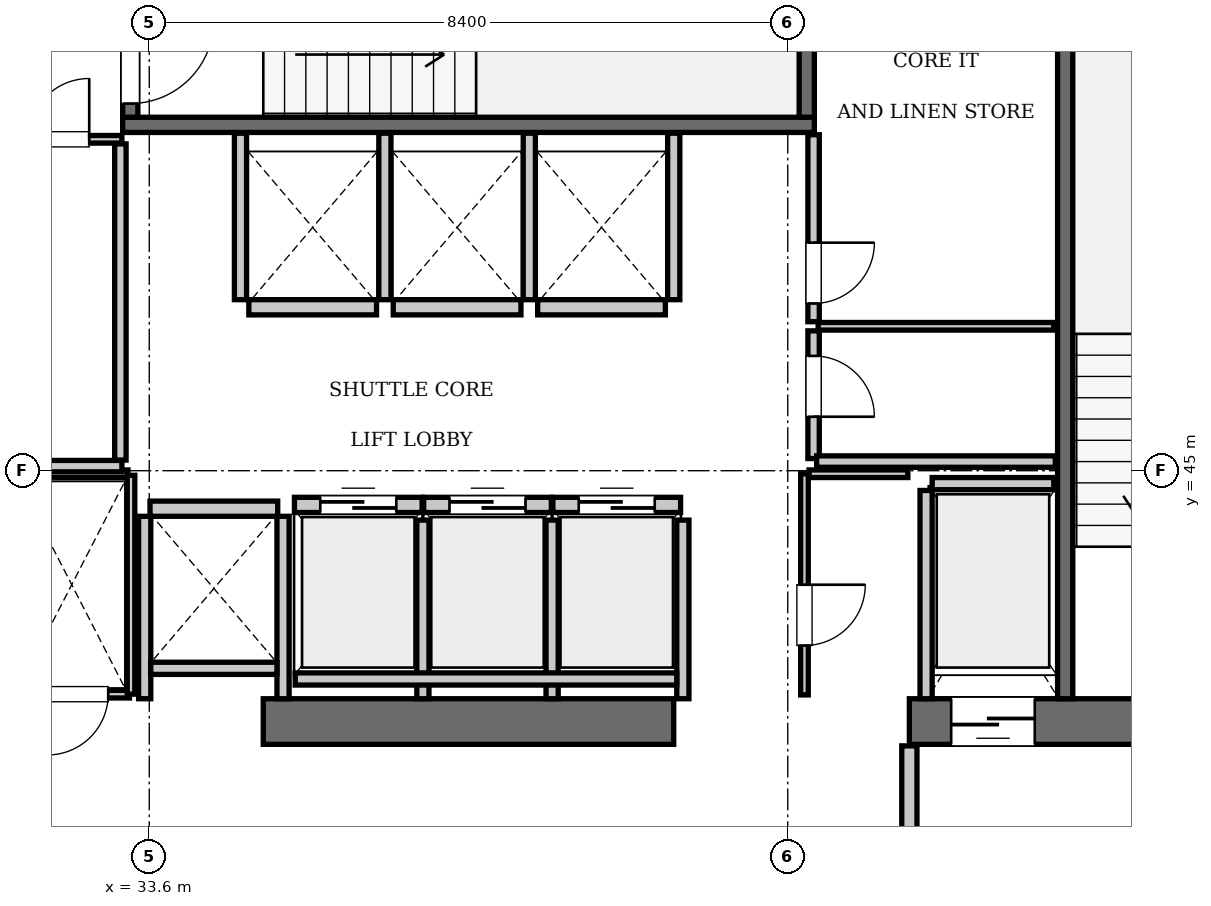
"""IFC4 building model, lengths in metres.
Left out: names, types, materials, properties, quantities, classifications, styles, units other than length and angle.
Written with IfcOpenShell. Run it as: python <this file> out.ifc"""

import sys

from ifc_helpers import new_model, si_unit, direction, frame, frame_2d, origin, place, context, subcontext, project, spatial, rectangle, extrude, element, fill, save


model = new_model("IFC4")
c1 = context("Model", 3, precision=1e-05, world=origin(), true_north=direction((0.0, 1.0)))
c2 = subcontext(c1, "Body", "Model", "MODEL_VIEW")
j1 = project(units=[si_unit("LENGTHUNIT", "METRE"), si_unit("PLANEANGLEUNIT", "RADIAN")], contexts=[c1])
p1 = place(None, origin())
s1 = spatial("IfcSite", under=j1, at=p1, CompositionType="ELEMENT")
p2 = place(p1, origin())
s2 = spatial("IfcBuilding", under=s1, at=p2, CompositionType="ELEMENT")
p3 = place(p2, frame((0.0, 0.0, 274.05)))
s3 = spatial("IfcBuildingStorey", under=s2, at=p3, CompositionType="ELEMENT", Elevation=274.05)
p4 = place(p3, frame((35.1, 41.7, 0.0), z_axis=(0.0, 0.0, 1.0), x_axis=(1.0, 0.0, 0.0)))
e1 = element("IfcWall", 1, at=p4, inside=s3, PredefinedType="SHEAR", context=c2, shape_type="SweptSolid", body=[
    extrude(rectangle(XDim=5.4, YDim=0.6, at=frame_2d((2.7, 0.0))), origin(), (0.0, 0.0, 1.0), 3.85),
])
p5 = place(p3, frame((43.6, 41.7, 0.0), z_axis=(0.0, 0.0, 1.0), x_axis=(1.0, 0.0, 0.0)))
e2 = element("IfcWall", 2, at=p5, inside=s3, PredefinedType="SHEAR", context=c2, shape_type="SweptSolid", body=[
    extrude(rectangle(XDim=6.8, YDim=0.6, at=frame_2d((3.4, 0.0))), origin(), (0.0, 0.0, 1.0), 3.85),
])
p6 = place(p5, frame((3.9, 0.0, 0.0)))
e3 = element("IfcOpeningElement", 3, at=p6, cuts=e2, PredefinedType="OPENING", context=c2, shape_type="SweptSolid", body=[
    extrude(rectangle(XDim=1.15, YDim=2.15, at=frame_2d((0.575, 1.075))), frame((0.0, 0.31, 0.0), z_axis=(0.0, -1.0, 0.0), x_axis=(1.0, 0.0, 0.0)), (0.0, 0.0, 1.0), 0.62),
])
p7 = place(p5, frame((0.55, 0.0, 0.0)))
e4 = element("IfcOpeningElement", 4, at=p7, cuts=e2, PredefinedType="OPENING", context=c2, shape_type="SweptSolid", body=[
    extrude(rectangle(XDim=1.1, YDim=2.2, at=frame_2d((0.55, 1.1))), frame((0.0, 0.31, 0.0), z_axis=(0.0, -1.0, 0.0), x_axis=(1.0, 0.0, 0.0)), (0.0, 0.0, 1.0), 0.62),
])
p8 = place(p3, frame((33.25, 49.55, 0.0), z_axis=(0.0, 0.0, 1.0), x_axis=(1.0, 0.0, 0.0)))
e5 = element("IfcWall", 5, at=p8, inside=s3, PredefinedType="SOLIDWALL", context=c2, shape_type="SweptSolid", body=[
    extrude(rectangle(XDim=9.1, YDim=0.2, at=frame_2d((4.55, 0.0))), origin(), (0.0, 0.0, 1.0), 3.61),
])
p9 = place(p3, frame((42.25, 49.65, 0.0), z_axis=(0.0, 0.0, 1.0), x_axis=(0.0, 1.0, 0.0)))
e6 = element("IfcWall", 6, at=p9, inside=s3, PredefinedType="SOLIDWALL", context=c2, shape_type="SweptSolid", body=[
    extrude(rectangle(XDim=3.75, YDim=0.2, at=frame_2d((1.875, 0.0))), origin(), (0.0, 0.0, 1.0), 3.61),
])
p10 = place(p3, frame((33.35, 49.65, 0.0), z_axis=(0.0, 0.0, 1.0), x_axis=(0.0, 1.0, 0.0)))
e7 = element("IfcWall", 7, at=p10, inside=s3, PredefinedType="SOLIDWALL", context=c2, shape_type="SweptSolid", body=[
    extrude(rectangle(XDim=3.75, YDim=0.2, at=frame_2d((1.875, 0.0))), origin(), (0.0, 0.0, 1.0), 3.61),
])
p11 = place(p10, frame((0.18, 0.0, 0.0)))
e8 = element("IfcOpeningElement", 8, at=p11, cuts=e7, PredefinedType="OPENING", context=c2, shape_type="SweptSolid", body=[
    extrude(rectangle(XDim=1.1, YDim=2.15, at=frame_2d((0.55, 1.075))), frame((0.0, 0.11, 0.0), z_axis=(0.0, -1.0, 0.0), x_axis=(1.0, 0.0, 0.0)), (0.0, 0.0, 1.0), 0.22),
])
p12 = place(p3, frame((45.65, 42.0, 0.0), z_axis=(0.0, 0.0, 1.0), x_axis=(0.0, 1.0, 0.0)))
e9 = element("IfcWall", 9, at=p12, inside=s3, PredefinedType="SOLIDWALL", context=c2, shape_type="SweptSolid", body=[
    extrude(rectangle(XDim=9.15, YDim=0.2, at=frame_2d((4.575, 0.0))), origin(), (0.0, 0.0, 1.0), 3.61),
])
p13 = place(p3, frame((35.51, 44.55, 0.0), z_axis=(0.0, 0.0, 1.0), x_axis=(1.0, 0.0, 0.0)))
e10 = element("IfcWall", 10, at=p13, inside=s3, PredefinedType="SOLIDWALL", context=c2, shape_type="SweptSolid", body=[
    extrude(rectangle(XDim=1.68, YDim=0.2, at=frame_2d((0.84, 0.0))), origin(), (0.0, 0.0, 1.0), 3.61),
])
p14 = place(p13, frame((0.34, 0.0, 0.0)))
e11 = element("IfcOpeningElement", 11, at=p14, cuts=e10, PredefinedType="OPENING", context=c2, shape_type="SweptSolid", body=[
    extrude(rectangle(XDim=1.0, YDim=2.15, at=frame_2d((0.5, 1.075))), frame((0.0, 0.11, 0.0), z_axis=(0.0, -1.0, 0.0), x_axis=(1.0, 0.0, 0.0)), (0.0, 0.0, 1.0), 0.22),
])
p15 = place(p3, frame((37.21, 44.55, 0.0), z_axis=(0.0, 0.0, 1.0), x_axis=(1.0, 0.0, 0.0)))
e12 = element("IfcWall", 12, at=p15, inside=s3, PredefinedType="SOLIDWALL", context=c2, shape_type="SweptSolid", body=[
    extrude(rectangle(XDim=1.68, YDim=0.2, at=frame_2d((0.84, 0.0))), origin(), (0.0, 0.0, 1.0), 3.61),
])
p16 = place(p15, frame((0.34, 0.0, 0.0)))
e13 = element("IfcOpeningElement", 13, at=p16, cuts=e12, PredefinedType="OPENING", context=c2, shape_type="SweptSolid", body=[
    extrude(rectangle(XDim=1.0, YDim=2.15, at=frame_2d((0.5, 1.075))), frame((0.0, 0.11, 0.0), z_axis=(0.0, -1.0, 0.0), x_axis=(1.0, 0.0, 0.0)), (0.0, 0.0, 1.0), 0.22),
])
p17 = place(p3, frame((38.91, 44.55, 0.0), z_axis=(0.0, 0.0, 1.0), x_axis=(1.0, 0.0, 0.0)))
e14 = element("IfcWall", 14, at=p17, inside=s3, PredefinedType="SOLIDWALL", context=c2, shape_type="SweptSolid", body=[
    extrude(rectangle(XDim=1.68, YDim=0.2, at=frame_2d((0.84, 0.0))), origin(), (0.0, 0.0, 1.0), 3.61),
])
p18 = place(p17, frame((0.34, 0.0, 0.0)))
e15 = element("IfcOpeningElement", 15, at=p18, cuts=e14, PredefinedType="OPENING", context=c2, shape_type="SweptSolid", body=[
    extrude(rectangle(XDim=1.0, YDim=2.15, at=frame_2d((0.5, 1.075))), frame((0.0, 0.11, 0.0), z_axis=(0.0, -1.0, 0.0), x_axis=(1.0, 0.0, 0.0)), (0.0, 0.0, 1.0), 0.22),
])
p19 = place(p3, frame((34.91, 47.15, 0.0), z_axis=(0.0, 0.0, 1.0), x_axis=(1.0, 0.0, 0.0)))
e16 = element("IfcWall", 16, at=p19, inside=s3, PredefinedType="SOLIDWALL", context=c2, shape_type="SweptSolid", body=[
    extrude(rectangle(XDim=1.68, YDim=0.2, at=frame_2d((0.84, 0.0))), origin(), (0.0, 0.0, 1.0), 3.61),
])
for number, where, z_axis, x_axis in (
    (17, (36.81, 47.15, 0.0), (0.0, 0.0, 1.0), (1.0, 0.0, 0.0)),
    (18, (38.71, 47.15, 0.0), (0.0, 0.0, 1.0), (1.0, 0.0, 0.0)),
    (19, (33.61, 44.5, 0.0), (0.0, 0.0, 1.0), (1.0, 0.0, 0.0)),
):
    element("IfcWall", number, at=place(p3, frame(where, z_axis=z_axis, x_axis=x_axis)), inside=s3, PredefinedType="SOLIDWALL", context=c2, shape_type="SweptSolid", body=[
        extrude(rectangle(XDim=1.68, YDim=0.2, at=frame_2d((0.84, 0.0))), origin(), (0.0, 0.0, 1.0), 3.61),
    ])
p20 = place(p3, frame((43.9, 44.83, 0.0), z_axis=(0.0, 0.0, 1.0), x_axis=(1.0, 0.0, 0.0)))
e20 = element("IfcWall", 20, at=p20, inside=s3, PredefinedType="SOLIDWALL", context=c2, shape_type="SweptSolid", body=[
    extrude(rectangle(XDim=1.6, YDim=0.16, at=frame_2d((0.8, 0.0))), origin(), (0.0, 0.0, 1.0), 3.61),
])
p21 = place(p3, frame((43.82, 42.0, 0.0), z_axis=(0.0, 0.0, 1.0), x_axis=(0.0, 1.0, 0.0)))
e21 = element("IfcWall", 21, at=p21, inside=s3, PredefinedType="SOLIDWALL", context=c2, shape_type="SweptSolid", body=[
    extrude(rectangle(XDim=2.74, YDim=0.16, at=frame_2d((1.37, 0.0))), origin(), (0.0, 0.0, 1.0), 3.61),
])
for number, where, z_axis, x_axis in (
    (22, (37.2, 42.0, 0.0), (0.0, 0.0, 1.0), (0.0, 1.0, 0.0)),
    (23, (38.9, 42.0, 0.0), (0.0, 0.0, 1.0), (0.0, 1.0, 0.0)),
    (24, (40.62, 42.0, 0.0), (0.0, 0.0, 1.0), (0.0, 1.0, 0.0)),
):
    element("IfcWall", number, at=place(p3, frame(where, z_axis=z_axis, x_axis=x_axis)), inside=s3, PredefinedType="SOLIDWALL", context=c2, shape_type="SweptSolid", body=[
        extrude(rectangle(XDim=2.35, YDim=0.16, at=frame_2d((1.175, 0.0))), origin(), (0.0, 0.0, 1.0), 3.61),
    ])
p22 = place(p3, frame((35.52, 42.26, 0.0), z_axis=(0.0, 0.0, 1.0), x_axis=(1.0, 0.0, 0.0)))
e25 = element("IfcWall", 25, at=p22, inside=s3, PredefinedType="SOLIDWALL", context=c2, shape_type="SweptSolid", body=[
    extrude(rectangle(XDim=5.02, YDim=0.16, at=frame_2d((2.51, 0.0))), origin(), (0.0, 0.0, 1.0), 3.61),
])
for number, where, z_axis, x_axis in (
    (26, (34.8, 47.25, 0.0), (0.0, 0.0, 1.0), (0.0, 1.0, 0.0)),
    (27, (36.7, 47.25, 0.0), (0.0, 0.0, 1.0), (0.0, 1.0, 0.0)),
    (28, (38.6, 47.25, 0.0), (0.0, 0.0, 1.0), (0.0, 1.0, 0.0)),
    (29, (40.5, 47.25, 0.0), (0.0, 0.0, 1.0), (0.0, 1.0, 0.0)),
):
    element("IfcWall", number, at=place(p3, frame(where, z_axis=z_axis, x_axis=x_axis)), inside=s3, PredefinedType="SOLIDWALL", context=c2, shape_type="SweptSolid", body=[
        extrude(rectangle(XDim=2.19, YDim=0.16, at=frame_2d((1.095, 0.0))), origin(), (0.0, 0.0, 1.0), 3.61),
    ])
for number, where, z_axis, x_axis in (
    (30, (33.54, 42.0, 0.0), (0.0, 0.0, 1.0), (0.0, 1.0, 0.0)),
    (31, (35.36, 42.0, 0.0), (0.0, 0.0, 1.0), (0.0, 1.0, 0.0)),
):
    element("IfcWall", number, at=place(p3, frame(where, z_axis=z_axis, x_axis=x_axis)), inside=s3, PredefinedType="SOLIDWALL", context=c2, shape_type="SweptSolid", body=[
        extrude(rectangle(XDim=2.4, YDim=0.16, at=frame_2d((1.2, 0.0))), origin(), (0.0, 0.0, 1.0), 3.61),
    ])
p23 = place(p3, frame((33.62, 42.4, 0.0), z_axis=(0.0, 0.0, 1.0), x_axis=(1.0, 0.0, 0.0)))
e32 = element("IfcWall", 32, at=p23, inside=s3, PredefinedType="SOLIDWALL", context=c2, shape_type="SweptSolid", body=[
    extrude(rectangle(XDim=1.66, YDim=0.16, at=frame_2d((0.83, 0.0))), origin(), (0.0, 0.0, 1.0), 3.61),
])
p24 = place(p3, frame((43.6, 38.31, 0.0), z_axis=(0.0, 0.0, 1.0), x_axis=(0.0, 1.0, 0.0)))
e33 = element("IfcWall", 33, at=p24, inside=s3, PredefinedType="PARTITIONING", context=c2, shape_type="SweptSolid", body=[
    extrude(rectangle(XDim=3.07, YDim=0.2, at=frame_2d((1.535, 0.0))), origin(), (0.0, 0.0, 1.0), 3.61),
])
p25 = place(p3, frame((32.02, 42.06, 0.0), z_axis=(0.0, 0.0, 1.0), x_axis=(1.0, 0.0, 0.0)))
e34 = element("IfcWall", 34, at=p25, inside=s3, PredefinedType="PARTITIONING", context=c2, shape_type="SweptSolid", body=[
    extrude(rectangle(XDim=1.32, YDim=0.1, at=frame_2d((0.66, 0.0))), origin(), (0.0, 0.0, 1.0), 3.61),
])
p26 = place(p25, frame((0.24, 0.0, 0.0)))
e35 = element("IfcOpeningElement", 35, at=p26, cuts=e34, PredefinedType="OPENING", context=c2, shape_type="SweptSolid", body=[
    extrude(rectangle(XDim=0.8, YDim=2.05, at=frame_2d((0.4, 1.025))), frame((0.0, 0.06, 0.0), z_axis=(0.0, -1.0, 0.0), x_axis=(1.0, 0.0, 0.0)), (0.0, 0.0, 1.0), 0.12),
])
p27 = place(p3, frame((31.84, 44.96, 0.0), z_axis=(0.0, 0.0, 1.0), x_axis=(1.0, 0.0, 0.0)))
e36 = element("IfcWall", 36, at=p27, inside=s3, PredefinedType="PARTITIONING", context=c2, shape_type="SweptSolid", body=[
    extrude(rectangle(XDim=1.48, YDim=0.1, at=frame_2d((0.74, 0.0))), origin(), (0.0, 0.0, 1.0), 3.61),
])
p28 = place(p3, frame((33.36, 42.06, 0.0), z_axis=(0.0, 0.0, 1.0), x_axis=(0.0, 1.0, 0.0)))
e37 = element("IfcWall", 37, at=p28, inside=s3, PredefinedType="PARTITIONING", context=c2, shape_type="SweptSolid", body=[
    extrude(rectangle(XDim=2.88, YDim=0.1, at=frame_2d((1.44, 0.0))), origin(), (0.0, 0.0, 1.0), 3.61),
])
p29 = place(p3, frame((42.22, 42.05, 0.0), z_axis=(0.0, 0.0, 1.0), x_axis=(0.0, 1.0, 0.0)))
e38 = element("IfcWall", 38, at=p29, inside=s3, PredefinedType="PARTITIONING", context=c2, shape_type="SweptSolid", body=[
    extrude(rectangle(XDim=2.91, YDim=0.1, at=frame_2d((1.455, 0.0))), origin(), (0.0, 0.0, 1.0), 3.61),
])
p30 = place(p29, frame((0.65, 0.0, 0.0)))
e39 = element("IfcOpeningElement", 39, at=p30, cuts=e38, PredefinedType="OPENING", context=c2, shape_type="SweptSolid", body=[
    extrude(rectangle(XDim=0.8, YDim=2.05, at=frame_2d((0.4, 1.025))), frame((0.0, 0.06, 0.0), z_axis=(0.0, -1.0, 0.0), x_axis=(1.0, 0.0, 0.0)), (0.0, 0.0, 1.0), 0.12),
])
p31 = place(p3, frame((42.28, 44.96, 0.0), z_axis=(0.0, 0.0, 1.0), x_axis=(1.0, 0.0, 0.0)))
e40 = element("IfcWall", 40, at=p31, inside=s3, PredefinedType="PARTITIONING", context=c2, shape_type="SweptSolid", body=[
    extrude(rectangle(XDim=1.3, YDim=0.1, at=frame_2d((0.65, 0.0))), origin(), (0.0, 0.0, 1.0), 3.61),
])
p32 = place(p3, frame((30.06, 45.06, 0.0), z_axis=(0.0, 0.0, 1.0), x_axis=(1.0, 0.0, 0.0)))
e41 = element("IfcWall", 41, at=p32, inside=s3, PredefinedType="PARTITIONING", context=c2, shape_type="SweptSolid", body=[
    extrude(rectangle(XDim=3.18, YDim=0.15, at=frame_2d((1.59, 0.0))), origin(), (0.0, 0.0, 1.0), 3.61),
])
p33 = place(p3, frame((33.22, 45.14, 0.0), z_axis=(0.0, 0.0, 1.0), x_axis=(0.0, 1.0, 0.0)))
e42 = element("IfcWall", 42, at=p33, inside=s3, PredefinedType="PARTITIONING", context=c2, shape_type="SweptSolid", body=[
    extrude(rectangle(XDim=4.16, YDim=0.15, at=frame_2d((2.08, 0.0))), origin(), (0.0, 0.0, 1.0), 3.61),
])
p34 = place(p3, frame((30.06, 49.36, 0.0), z_axis=(0.0, 0.0, 1.0), x_axis=(1.0, 0.0, 0.0)))
e43 = element("IfcWall", 43, at=p34, inside=s3, PredefinedType="PARTITIONING", context=c2, shape_type="SweptSolid", body=[
    extrude(rectangle(XDim=3.18, YDim=0.1, at=frame_2d((1.59, 0.0))), origin(), (0.0, 0.0, 1.0), 3.61),
])
p35 = place(p34, frame((1.95, 0.0, 0.0)))
e44 = element("IfcOpeningElement", 44, at=p35, cuts=e43, PredefinedType="OPENING", context=c2, shape_type="SweptSolid", body=[
    extrude(rectangle(XDim=0.8, YDim=2.05, at=frame_2d((0.4, 1.025))), frame((0.0, 0.06, 0.0), z_axis=(0.0, -1.0, 0.0), x_axis=(1.0, 0.0, 0.0)), (0.0, 0.0, 1.0), 0.12),
])
p36 = place(p3, frame((42.34, 45.16, 0.0), z_axis=(0.0, 0.0, 1.0), x_axis=(0.0, 1.0, 0.0)))
e45 = element("IfcWall", 45, at=p36, inside=s3, PredefinedType="PARTITIONING", context=c2, shape_type="SweptSolid", body=[
    extrude(rectangle(XDim=1.68, YDim=0.15, at=frame_2d((0.84, 0.0))), origin(), (0.0, 0.0, 1.0), 3.61),
])
p37 = place(p36, frame((0.55, 0.0, 0.0)))
e46 = element("IfcOpeningElement", 46, at=p37, cuts=e45, PredefinedType="OPENING", context=c2, shape_type="SweptSolid", body=[
    extrude(rectangle(XDim=0.8, YDim=2.05, at=frame_2d((0.4, 1.025))), frame((0.0, 0.085, 0.0), z_axis=(0.0, -1.0, 0.0), x_axis=(1.0, 0.0, 0.0)), (0.0, 0.0, 1.0), 0.17),
])
p38 = place(p3, frame((42.34, 46.96, 0.0), z_axis=(0.0, 0.0, 1.0), x_axis=(0.0, 1.0, 0.0)))
e47 = element("IfcWall", 47, at=p38, inside=s3, PredefinedType="PARTITIONING", context=c2, shape_type="SweptSolid", body=[
    extrude(rectangle(XDim=2.46, YDim=0.15, at=frame_2d((1.23, 0.0))), origin(), (0.0, 0.0, 1.0), 3.61),
])
p39 = place(p38, frame((0.24, 0.0, 0.0)))
e48 = element("IfcOpeningElement", 48, at=p39, cuts=e47, PredefinedType="OPENING", context=c2, shape_type="SweptSolid", body=[
    extrude(rectangle(XDim=0.8, YDim=2.05, at=frame_2d((0.4, 1.025))), frame((0.0, 0.085, 0.0), z_axis=(0.0, -1.0, 0.0), x_axis=(1.0, 0.0, 0.0)), (0.0, 0.0, 1.0), 0.17),
])
p40 = place(p3, frame((42.4, 46.9, 0.0), z_axis=(0.0, 0.0, 1.0), x_axis=(1.0, 0.0, 0.0)))
e49 = element("IfcWall", 49, at=p40, inside=s3, PredefinedType="PARTITIONING", context=c2, shape_type="SweptSolid", body=[
    extrude(rectangle(XDim=3.1, YDim=0.1, at=frame_2d((1.55, 0.0))), origin(), (0.0, 0.0, 1.0), 3.61),
])
p41 = place(p3, frame((42.38, 45.12, 0.0), z_axis=(0.0, 0.0, 1.0), x_axis=(1.0, 0.0, 0.0)))
e50 = element("IfcWall", 50, at=p41, inside=s3, PredefinedType="PARTITIONING", context=c2, shape_type="SweptSolid", body=[
    extrude(rectangle(XDim=3.14, YDim=0.15, at=frame_2d((1.57, 0.0))), origin(), (0.0, 0.0, 1.0), 3.61),
])
p42 = place(p11, frame((1.1, 0.0, 0.0), z_axis=(0.0, 0.0, 1.0), x_axis=(-1.0, 0.0, 0.0)))
e51 = element("IfcDoor", 51, at=p42, inside=s3, OperationType="SINGLE_SWING_LEFT", PredefinedType="DOOR", context=c2, shape_type="SweptSolid", body=[
    extrude(rectangle(XDim=1.1, YDim=2.15, at=frame_2d((0.55, 1.075))), frame((0.0, 0.025, 0.0), z_axis=(0.0, -1.0, 0.0), x_axis=(1.0, 0.0, 0.0)), (0.0, 0.0, 1.0), 0.05),
])
fill(e8, e51)
p43 = place(p14, origin())
e52 = element("IfcDoor", 52, at=p43, inside=s3, OperationType="SLIDING_TO_LEFT", PredefinedType="DOOR", context=c2, shape_type="SweptSolid", body=[
    extrude(rectangle(XDim=1.0, YDim=2.15, at=frame_2d((0.5, 1.075))), frame((0.0, 0.025, 0.0), z_axis=(0.0, -1.0, 0.0), x_axis=(1.0, 0.0, 0.0)), (0.0, 0.0, 1.0), 0.05),
])
fill(e11, e52)
p44 = place(p16, origin())
e53 = element("IfcDoor", 53, at=p44, inside=s3, OperationType="SLIDING_TO_LEFT", PredefinedType="DOOR", context=c2, shape_type="SweptSolid", body=[
    extrude(rectangle(XDim=1.0, YDim=2.15, at=frame_2d((0.5, 1.075))), frame((0.0, 0.025, 0.0), z_axis=(0.0, -1.0, 0.0), x_axis=(1.0, 0.0, 0.0)), (0.0, 0.0, 1.0), 0.05),
])
fill(e13, e53)
p45 = place(p18, origin())
e54 = element("IfcDoor", 54, at=p45, inside=s3, OperationType="SLIDING_TO_LEFT", PredefinedType="DOOR", context=c2, shape_type="SweptSolid", body=[
    extrude(rectangle(XDim=1.0, YDim=2.15, at=frame_2d((0.5, 1.075))), frame((0.0, 0.025, 0.0), z_axis=(0.0, -1.0, 0.0), x_axis=(1.0, 0.0, 0.0)), (0.0, 0.0, 1.0), 0.05),
])
fill(e15, e54)
p46 = place(p7, frame((1.1, 0.0, 0.0), z_axis=(0.0, 0.0, 1.0), x_axis=(-1.0, 0.0, 0.0)))
e55 = element("IfcDoor", 55, at=p46, inside=s3, OperationType="SLIDING_TO_LEFT", PredefinedType="DOOR", context=c2, shape_type="SweptSolid", body=[
    extrude(rectangle(XDim=1.1, YDim=2.2, at=frame_2d((0.55, 1.1))), frame((0.0, 0.025, 0.0), z_axis=(0.0, -1.0, 0.0), x_axis=(1.0, 0.0, 0.0)), (0.0, 0.0, 1.0), 0.05),
])
fill(e4, e55)
p47 = place(p26, frame((0.8, 0.0, 0.0), z_axis=(0.0, 0.0, 1.0), x_axis=(-1.0, 0.0, 0.0)))
e56 = element("IfcDoor", 56, at=p47, inside=s3, OperationType="SINGLE_SWING_RIGHT", PredefinedType="DOOR", context=c2, shape_type="SweptSolid", body=[
    extrude(rectangle(XDim=0.8, YDim=2.05, at=frame_2d((0.4, 1.025))), frame((0.0, 0.025, 0.0), z_axis=(0.0, -1.0, 0.0), x_axis=(1.0, 0.0, 0.0)), (0.0, 0.0, 1.0), 0.05),
])
fill(e35, e56)
p48 = place(p30, frame((0.8, 0.0, 0.0), z_axis=(0.0, 0.0, 1.0), x_axis=(-1.0, 0.0, 0.0)))
e57 = element("IfcDoor", 57, at=p48, inside=s3, OperationType="SINGLE_SWING_LEFT", PredefinedType="DOOR", context=c2, shape_type="SweptSolid", body=[
    extrude(rectangle(XDim=0.8, YDim=2.05, at=frame_2d((0.4, 1.025))), frame((0.0, 0.025, 0.0), z_axis=(0.0, -1.0, 0.0), x_axis=(1.0, 0.0, 0.0)), (0.0, 0.0, 1.0), 0.05),
])
fill(e39, e57)
p49 = place(p35, origin())
e58 = element("IfcDoor", 58, at=p49, inside=s3, OperationType="SINGLE_SWING_RIGHT", PredefinedType="DOOR", context=c2, shape_type="SweptSolid", body=[
    extrude(rectangle(XDim=0.8, YDim=2.05, at=frame_2d((0.4, 1.025))), frame((0.0, 0.025, 0.0), z_axis=(0.0, -1.0, 0.0), x_axis=(1.0, 0.0, 0.0)), (0.0, 0.0, 1.0), 0.05),
])
fill(e44, e58)
p50 = place(p37, frame((0.8, 0.0, 0.0), z_axis=(0.0, 0.0, 1.0), x_axis=(-1.0, 0.0, 0.0)))
e59 = element("IfcDoor", 59, at=p50, inside=s3, OperationType="SINGLE_SWING_RIGHT", PredefinedType="DOOR", context=c2, shape_type="SweptSolid", body=[
    extrude(rectangle(XDim=0.8, YDim=2.05, at=frame_2d((0.4, 1.025))), frame((0.0, 0.025, 0.0), z_axis=(0.0, -1.0, 0.0), x_axis=(1.0, 0.0, 0.0)), (0.0, 0.0, 1.0), 0.05),
])
fill(e46, e59)
p51 = place(p39, frame((0.8, 0.0, 0.0), z_axis=(0.0, 0.0, 1.0), x_axis=(-1.0, 0.0, 0.0)))
e60 = element("IfcDoor", 60, at=p51, inside=s3, OperationType="SINGLE_SWING_LEFT", PredefinedType="DOOR", context=c2, shape_type="SweptSolid", body=[
    extrude(rectangle(XDim=0.8, YDim=2.05, at=frame_2d((0.4, 1.025))), frame((0.0, 0.025, 0.0), z_axis=(0.0, -1.0, 0.0), x_axis=(1.0, 0.0, 0.0)), (0.0, 0.0, 1.0), 0.05),
])
fill(e48, e60)
save(model, sys.argv[1])
